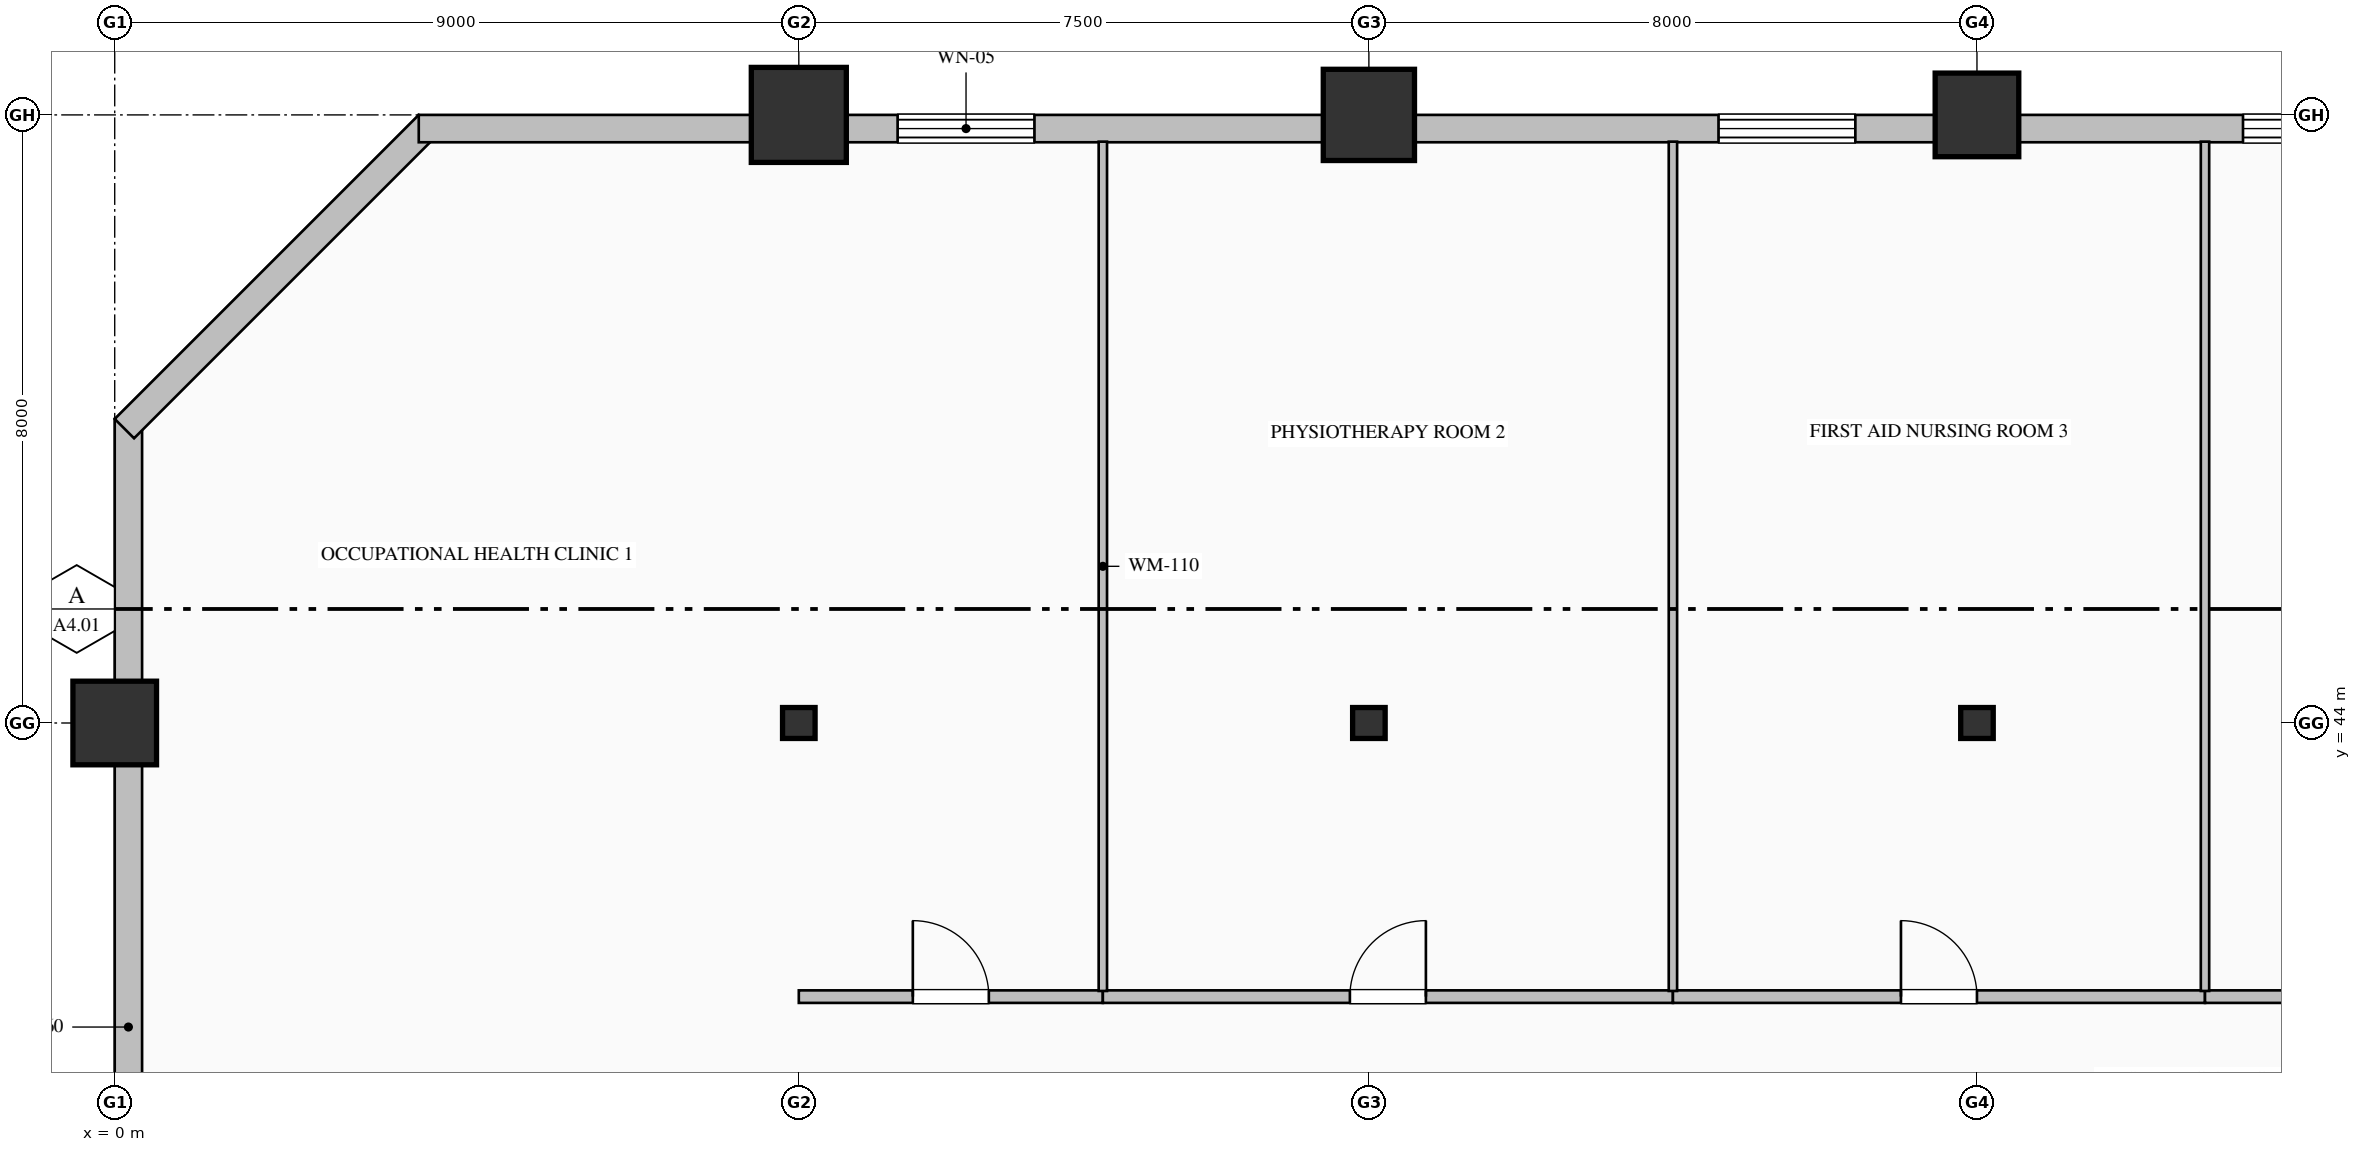
"""IFC4 building model, lengths in metres.
Left out: names, types, materials, properties, quantities, classifications, styles, units other than length and angle.
Written with IfcOpenShell. Run it as: python <this file> out.ifc"""

import sys

from ifc_helpers import new_model, si_unit, direction, frame, frame_2d, origin, origin_2d, place, context, subcontext, project, spatial, rectangle, hollow_rectangle, hollow_circle, i_section, extrude, element, fill, save


model = new_model("IFC4")
c1 = context("Model", 3, precision=1e-05, world=origin(), true_north=direction((0.0, 1.0)))
c2 = subcontext(c1, "Body", "Model", "MODEL_VIEW")
j1 = project(units=[si_unit("LENGTHUNIT", "METRE"), si_unit("PLANEANGLEUNIT", "RADIAN")], contexts=[c1])
p1 = place(None, origin())
s1 = spatial("IfcSite", under=j1, at=p1, CompositionType="ELEMENT")
p2 = place(p1, origin())
s2 = spatial("IfcBuilding", under=s1, at=p2, CompositionType="ELEMENT")
p3 = place(p2, frame((0.0, 0.0, 88.2)))
s3 = spatial("IfcBuildingStorey", under=s2, at=p3, CompositionType="ELEMENT", Elevation=88.2)
p4 = place(p3, frame((0.0, 44.0, 0.0), z_axis=(0.0, 0.0, 1.0), x_axis=(1.0, 0.0, 0.0)))
e1 = element("IfcColumn", 1, at=p4, inside=s3, PredefinedType="COLUMN", context=c2, shape_type="SweptSolid", body=[
    extrude(hollow_rectangle(XDim=1.1, YDim=1.1, WallThickness=0.04, at=origin_2d()), origin(), (0.0, 0.0, 1.0), 4.0),
])
p5 = place(p3, frame((9.0, 44.0, 0.0), z_axis=(0.0, 0.0, 1.0), x_axis=(1.0, 0.0, 0.0)))
e2 = element("IfcColumn", 2, at=p5, inside=s3, PredefinedType="COLUMN", context=c2, shape_type="SweptSolid", body=[
    extrude(i_section(OverallWidth=0.407, OverallDepth=0.428, WebThickness=0.02, FlangeThickness=0.035, FilletRadius=0.022, at=origin_2d()), origin(), (0.0, 0.0, 1.0), 4.0),
])
p6 = place(p3, frame((9.0, 52.0, 0.0), z_axis=(0.0, 0.0, 1.0), x_axis=(1.0, 0.0, 0.0)))
e3 = element("IfcColumn", 3, at=p6, inside=s3, PredefinedType="COLUMN", context=c2, shape_type="SweptSolid", body=[
    extrude(hollow_rectangle(XDim=1.25, YDim=1.25, WallThickness=0.045, at=origin_2d()), origin(), (0.0, 0.0, 1.0), 4.0),
])
p7 = place(p3, frame((16.5, 44.0, 0.0), z_axis=(0.0, 0.0, 1.0), x_axis=(1.0, 0.0, 0.0)))
e4 = element("IfcColumn", 4, at=p7, inside=s3, PredefinedType="COLUMN", context=c2, shape_type="SweptSolid", body=[
    extrude(i_section(OverallWidth=0.407, OverallDepth=0.428, WebThickness=0.02, FlangeThickness=0.035, FilletRadius=0.022, at=origin_2d()), origin(), (0.0, 0.0, 1.0), 4.0),
])
p8 = place(p3, frame((16.5, 52.0, 0.0), z_axis=(0.0, 0.0, 1.0), x_axis=(1.0, 0.0, 0.0)))
e5 = element("IfcColumn", 5, at=p8, inside=s3, PredefinedType="COLUMN", context=c2, shape_type="SweptSolid", body=[
    extrude(hollow_circle(Radius=0.6, WallThickness=0.04, at=origin_2d()), origin(), (0.0, 0.0, 1.0), 4.0),
])
p9 = place(p3, frame((24.5, 44.0, 0.0), z_axis=(0.0, 0.0, 1.0), x_axis=(1.0, 0.0, 0.0)))
e6 = element("IfcColumn", 6, at=p9, inside=s3, PredefinedType="COLUMN", context=c2, shape_type="SweptSolid", body=[
    extrude(i_section(OverallWidth=0.407, OverallDepth=0.428, WebThickness=0.02, FlangeThickness=0.035, FilletRadius=0.022, at=origin_2d()), origin(), (0.0, 0.0, 1.0), 4.0),
])
p10 = place(p3, frame((24.5, 52.0, 0.0), z_axis=(0.0, 0.0, 1.0), x_axis=(1.0, 0.0, 0.0)))
e7 = element("IfcColumn", 7, at=p10, inside=s3, PredefinedType="COLUMN", context=c2, shape_type="SweptSolid", body=[
    extrude(hollow_rectangle(XDim=1.1, YDim=1.1, WallThickness=0.04, at=origin_2d()), origin(), (0.0, 0.0, 1.0), 4.0),
])
p11 = place(p3, frame((0.18, 32.0, 0.0), z_axis=(0.0, 0.0, 1.0), x_axis=(0.0, 1.0, 0.0)))
e8 = element("IfcWall", 8, at=p11, inside=s3, PredefinedType="SOLIDWALL", context=c2, shape_type="SweptSolid", body=[
    extrude(rectangle(XDim=16.0, YDim=0.36, at=frame_2d((8.0, 0.0))), origin(), (0.0, 0.0, 1.0), 3.25),
])
p12 = place(p3, frame((0.127, 47.873, 0.0), z_axis=(0.0, 0.0, 1.0), x_axis=(0.707106781187, 0.707106781187, 0.0)))
e9 = element("IfcWall", 9, at=p12, inside=s3, PredefinedType="SOLIDWALL", context=c2, shape_type="SweptSolid", body=[
    extrude(rectangle(XDim=5.657, YDim=0.36, at=frame_2d((2.828, 0.0))), origin(), (0.0, 0.0, 1.0), 3.75),
])
p13 = place(p3, frame((4.0, 51.82, 0.0), z_axis=(0.0, 0.0, 1.0), x_axis=(1.0, 0.0, 0.0)))
e10 = element("IfcWall", 10, at=p13, inside=s3, PredefinedType="SOLIDWALL", context=c2, shape_type="SweptSolid", body=[
    extrude(rectangle(XDim=36.52, YDim=0.36, at=frame_2d((18.26, 0.0))), origin(), (0.0, 0.0, 1.0), 3.25),
])
p14 = place(p13, frame((6.3, 0.0, 0.85)))
e11 = element("IfcOpeningElement", 11, at=p14, cuts=e10, PredefinedType="OPENING", context=c2, shape_type="SweptSolid", body=[
    extrude(rectangle(XDim=1.8, YDim=2.05, at=frame_2d((0.9, 1.025))), frame((0.0, 0.19, 0.0), z_axis=(0.0, -1.0, 0.0), x_axis=(1.0, 0.0, 0.0)), (0.0, 0.0, 1.0), 0.38),
])
p15 = place(p13, frame((17.1, 0.0, 0.85)))
e12 = element("IfcOpeningElement", 12, at=p15, cuts=e10, PredefinedType="OPENING", context=c2, shape_type="SweptSolid", body=[
    extrude(rectangle(XDim=1.8, YDim=2.05, at=frame_2d((0.9, 1.025))), frame((0.0, 0.19, 0.0), z_axis=(0.0, -1.0, 0.0), x_axis=(1.0, 0.0, 0.0)), (0.0, 0.0, 1.0), 0.38),
])
p16 = place(p13, frame((24.0, 0.0, 0.8)))
e13 = element("IfcOpeningElement", 13, at=p16, cuts=e10, PredefinedType="OPENING", context=c2, shape_type="SweptSolid", body=[
    extrude(rectangle(XDim=2.4, YDim=2.15, at=frame_2d((1.2, 1.075))), frame((0.0, 0.19, 0.0), z_axis=(0.0, -1.0, 0.0), x_axis=(1.0, 0.0, 0.0)), (0.0, 0.0, 1.0), 0.38),
])
p17 = place(p3, frame((9.0, 40.4, 0.0), z_axis=(0.0, 0.0, 1.0), x_axis=(1.0, 0.0, 0.0)))
e14 = element("IfcWall", 14, at=p17, inside=s3, PredefinedType="PARTITIONING", context=c2, shape_type="SweptSolid", body=[
    extrude(rectangle(XDim=4.0, YDim=0.165, at=frame_2d((2.0, 0.0))), origin(), (0.0, 0.0, 1.0), 3.75),
])
p18 = place(p17, frame((1.5, 0.0, 0.0)))
e15 = element("IfcOpeningElement", 15, at=p18, cuts=e14, PredefinedType="OPENING", context=c2, shape_type="SweptSolid", body=[
    extrude(rectangle(XDim=1.0, YDim=2.15, at=frame_2d((0.5, 1.075))), frame((0.0, 0.093, 0.0), z_axis=(0.0, -1.0, 0.0), x_axis=(1.0, 0.0, 0.0)), (0.0, 0.0, 1.0), 0.185),
])
p19 = place(p3, frame((13.0, 40.4, 0.0), z_axis=(0.0, 0.0, 1.0), x_axis=(1.0, 0.0, 0.0)))
e16 = element("IfcWall", 16, at=p19, inside=s3, PredefinedType="PARTITIONING", context=c2, shape_type="SweptSolid", body=[
    extrude(rectangle(XDim=7.5, YDim=0.165, at=frame_2d((3.75, 0.0))), origin(), (0.0, 0.0, 1.0), 3.75),
])
p20 = place(p19, frame((3.25, 0.0, 0.0)))
e17 = element("IfcOpeningElement", 17, at=p20, cuts=e16, PredefinedType="OPENING", context=c2, shape_type="SweptSolid", body=[
    extrude(rectangle(XDim=1.0, YDim=2.15, at=frame_2d((0.5, 1.075))), frame((0.0, 0.093, 0.0), z_axis=(0.0, -1.0, 0.0), x_axis=(1.0, 0.0, 0.0)), (0.0, 0.0, 1.0), 0.185),
])
p21 = place(p3, frame((20.5, 40.4, 0.0), z_axis=(0.0, 0.0, 1.0), x_axis=(1.0, 0.0, 0.0)))
e18 = element("IfcWall", 18, at=p21, inside=s3, PredefinedType="PARTITIONING", context=c2, shape_type="SweptSolid", body=[
    extrude(rectangle(XDim=7.0, YDim=0.165, at=frame_2d((3.5, 0.0))), origin(), (0.0, 0.0, 1.0), 3.75),
])
p22 = place(p21, frame((3.0, 0.0, 0.0)))
e19 = element("IfcOpeningElement", 19, at=p22, cuts=e18, PredefinedType="OPENING", context=c2, shape_type="SweptSolid", body=[
    extrude(rectangle(XDim=1.0, YDim=2.15, at=frame_2d((0.5, 1.075))), frame((0.0, 0.093, 0.0), z_axis=(0.0, -1.0, 0.0), x_axis=(1.0, 0.0, 0.0)), (0.0, 0.0, 1.0), 0.185),
])
p23 = place(p3, frame((27.5, 40.4, 0.0), z_axis=(0.0, 0.0, 1.0), x_axis=(1.0, 0.0, 0.0)))
e20 = element("IfcWall", 20, at=p23, inside=s3, PredefinedType="PARTITIONING", context=c2, shape_type="SweptSolid", body=[
    extrude(rectangle(XDim=10.3, YDim=0.165, at=frame_2d((5.15, 0.0))), origin(), (0.0, 0.0, 1.0), 3.75),
])
p24 = place(p23, frame((4.65, 0.0, 0.0)))
e21 = element("IfcOpeningElement", 21, at=p24, cuts=e20, PredefinedType="OPENING", context=c2, shape_type="SweptSolid", body=[
    extrude(rectangle(XDim=1.0, YDim=2.15, at=frame_2d((0.5, 1.075))), frame((0.0, 0.093, 0.0), z_axis=(0.0, -1.0, 0.0), x_axis=(1.0, 0.0, 0.0)), (0.0, 0.0, 1.0), 0.185),
])
for number, where, z_axis, x_axis in (
    (22, (13.0, 51.648, 0.0), (0.0, 0.0, 1.0), (0.0, -1.0, 0.0)),
    (23, (20.5, 51.648, 0.0), (0.0, 0.0, 1.0), (0.0, -1.0, 0.0)),
    (24, (27.5, 51.648, 0.0), (0.0, 0.0, 1.0), (0.0, -1.0, 0.0)),
):
    element("IfcWall", number, at=place(p3, frame(where, z_axis=z_axis, x_axis=x_axis)), inside=s3, PredefinedType="MOVABLE", context=c2, shape_type="SweptSolid", body=[
        extrude(rectangle(XDim=11.173, YDim=0.11, at=frame_2d((5.587, 0.0))), origin(), (0.0, 0.0, 1.0), 3.75),
    ])
p25 = place(p14, origin())
e25 = element("IfcWindow", 25, at=p25, inside=s3, PartitioningType="TRIPLE_PANEL_VERTICAL", PredefinedType="WINDOW", context=c2, shape_type="SweptSolid", body=[
    extrude(rectangle(XDim=1.8, YDim=2.05, at=frame_2d((0.9, 1.025))), frame((0.0, 0.15, 0.0), z_axis=(0.0, -1.0, 0.0), x_axis=(1.0, 0.0, 0.0)), (0.0, 0.0, 1.0), 0.06),
])
fill(e11, e25)
p26 = place(p15, origin())
e26 = element("IfcWindow", 26, at=p26, inside=s3, PartitioningType="TRIPLE_PANEL_VERTICAL", PredefinedType="WINDOW", context=c2, shape_type="SweptSolid", body=[
    extrude(rectangle(XDim=1.8, YDim=2.05, at=frame_2d((0.9, 1.025))), frame((0.0, 0.15, 0.0), z_axis=(0.0, -1.0, 0.0), x_axis=(1.0, 0.0, 0.0)), (0.0, 0.0, 1.0), 0.06),
])
fill(e12, e26)
p27 = place(p16, origin())
e27 = element("IfcWindow", 27, at=p27, inside=s3, PartitioningType="TRIPLE_PANEL_VERTICAL", PredefinedType="WINDOW", context=c2, shape_type="SweptSolid", body=[
    extrude(rectangle(XDim=2.4, YDim=2.15, at=frame_2d((1.2, 1.075))), frame((0.0, 0.15, 0.0), z_axis=(0.0, -1.0, 0.0), x_axis=(1.0, 0.0, 0.0)), (0.0, 0.0, 1.0), 0.06),
])
fill(e13, e27)
p28 = place(p18, origin())
e28 = element("IfcDoor", 28, at=p28, inside=s3, OperationType="SINGLE_SWING_LEFT", PredefinedType="DOOR", context=c2, shape_type="SweptSolid", body=[
    extrude(rectangle(XDim=1.0, YDim=2.15, at=frame_2d((0.5, 1.075))), frame((0.0, 0.025, 0.0), z_axis=(0.0, -1.0, 0.0), x_axis=(1.0, 0.0, 0.0)), (0.0, 0.0, 1.0), 0.05),
])
fill(e15, e28)
p29 = place(p20, origin())
e29 = element("IfcDoor", 29, at=p29, inside=s3, OperationType="SINGLE_SWING_RIGHT", PredefinedType="DOOR", context=c2, shape_type="SweptSolid", body=[
    extrude(rectangle(XDim=1.0, YDim=2.15, at=frame_2d((0.5, 1.075))), frame((0.0, 0.025, 0.0), z_axis=(0.0, -1.0, 0.0), x_axis=(1.0, 0.0, 0.0)), (0.0, 0.0, 1.0), 0.05),
])
fill(e17, e29)
p30 = place(p22, origin())
e30 = element("IfcDoor", 30, at=p30, inside=s3, OperationType="SINGLE_SWING_LEFT", PredefinedType="DOOR", context=c2, shape_type="SweptSolid", body=[
    extrude(rectangle(XDim=1.0, YDim=2.15, at=frame_2d((0.5, 1.075))), frame((0.0, 0.025, 0.0), z_axis=(0.0, -1.0, 0.0), x_axis=(1.0, 0.0, 0.0)), (0.0, 0.0, 1.0), 0.05),
])
fill(e19, e30)
save(model, sys.argv[1])
